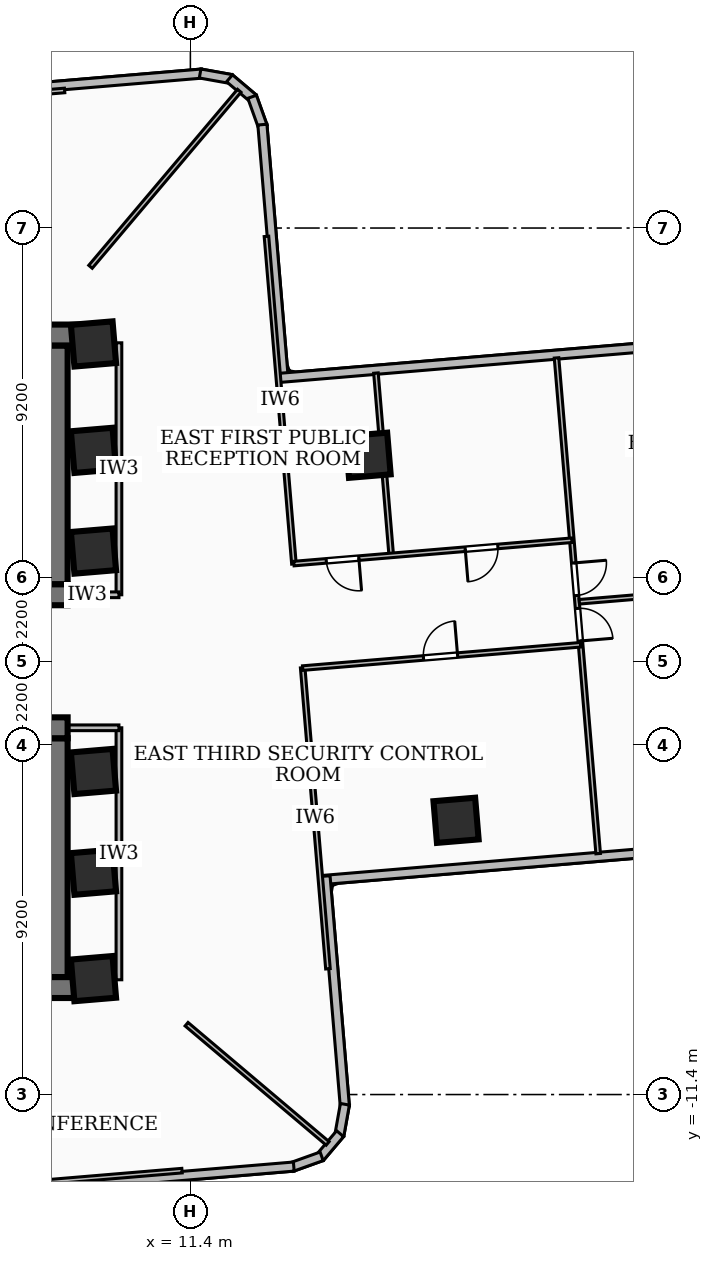
"""IFC4 building model, lengths in metres.
Left out: names, types, materials, properties, quantities, classifications, styles, units other than length and angle.
Written with IfcOpenShell. Run it as: python <this file> out.ifc"""

import sys

from ifc_helpers import new_model, si_unit, direction, frame, frame_2d, origin, origin_2d, place, context, subcontext, project, spatial, rectangle, extrude, element, fill, save


model = new_model("IFC4")
c1 = context("Model", 3, precision=1e-05, world=origin(), true_north=direction((0.0, 1.0)))
c2 = subcontext(c1, "Body", "Model", "MODEL_VIEW")
j1 = project(units=[si_unit("LENGTHUNIT", "METRE"), si_unit("PLANEANGLEUNIT", "RADIAN")], contexts=[c1])
p1 = place(None, origin())
s1 = spatial("IfcSite", under=j1, at=p1, CompositionType="ELEMENT")
p2 = place(p1, origin())
s2 = spatial("IfcBuilding", under=s1, at=p2, CompositionType="ELEMENT")
p3 = place(p2, frame((0.0, 0.0, 64.08)))
s3 = spatial("IfcBuildingStorey", under=s2, at=p3, CompositionType="ELEMENT", Elevation=64.08)
p4 = place(p3, frame((-8.78, 8.585, 0.0), z_axis=(0.0, 0.0, 1.0), x_axis=(1.0, 0.0, 0.0)))
e1 = element("IfcWall", 1, at=p4, inside=s3, PredefinedType="SHEAR", context=c2, shape_type="SweptSolid", body=[
    extrude(rectangle(XDim=17.56, YDim=0.55, at=frame_2d((8.78, 0.0))), origin(), (0.0, 0.0, 1.0), 3.34),
])
p5 = place(p3, frame((8.17, 1.75, 0.0), z_axis=(0.0, 0.0, 1.0), x_axis=(-1.0, 0.0, 0.0)))
e2 = element("IfcWall", 2, at=p5, inside=s3, PredefinedType="SHEAR", context=c2, shape_type="SweptSolid", body=[
    extrude(rectangle(XDim=16.34, YDim=0.55, at=frame_2d((8.17, 0.0))), origin(), (0.0, 0.0, 1.0), 3.34),
])
p6 = place(p5, frame((7.45, 0.0, 0.0)))
e3 = element("IfcOpeningElement", 3, at=p6, cuts=e2, PredefinedType="OPENING", context=c2, shape_type="SweptSolid", body=[
    extrude(rectangle(XDim=1.0, YDim=2.1, at=frame_2d((0.5, 1.05))), frame((0.0, 0.285, 0.0), z_axis=(0.0, -1.0, 0.0), x_axis=(1.0, 0.0, 0.0)), (0.0, 0.0, 1.0), 0.57),
])
p7 = place(p5, frame((3.85, 0.0, 0.0)))
e4 = element("IfcOpeningElement", 4, at=p7, cuts=e2, PredefinedType="OPENING", context=c2, shape_type="SweptSolid", body=[
    extrude(rectangle(XDim=0.9, YDim=2.06, at=frame_2d((0.45, 1.03))), frame((0.0, 0.285, 0.0), z_axis=(0.0, -1.0, 0.0), x_axis=(1.0, 0.0, 0.0)), (0.0, 0.0, 1.0), 0.57),
])
p8 = place(p5, frame((2.35, 0.0, 0.0)))
e5 = element("IfcOpeningElement", 5, at=p8, cuts=e2, PredefinedType="OPENING", context=c2, shape_type="SweptSolid", body=[
    extrude(rectangle(XDim=0.9, YDim=2.06, at=frame_2d((0.45, 1.03))), frame((0.0, 0.285, 0.0), z_axis=(0.0, -1.0, 0.0), x_axis=(1.0, 0.0, 0.0)), (0.0, 0.0, 1.0), 0.57),
])
p9 = place(p5, frame((0.8, 0.0, 0.0)))
e6 = element("IfcOpeningElement", 6, at=p9, cuts=e2, PredefinedType="OPENING", context=c2, shape_type="SweptSolid", body=[
    extrude(rectangle(XDim=0.9, YDim=2.06, at=frame_2d((0.45, 1.03))), frame((0.0, 0.285, 0.0), z_axis=(0.0, -1.0, 0.0), x_axis=(1.0, 0.0, 0.0)), (0.0, 0.0, 1.0), 0.57),
])
p10 = place(p3, frame((7.895, 8.31, 0.0), z_axis=(0.0, 0.0, 1.0), x_axis=(0.0, -1.0, 0.0)))
e7 = element("IfcWall", 7, at=p10, inside=s3, PredefinedType="SHEAR", context=c2, shape_type="SweptSolid", body=[
    extrude(rectangle(XDim=6.285, YDim=0.55, at=frame_2d((3.143, 0.0))), origin(), (0.0, 0.0, 1.0), 3.34),
])
p11 = place(p3, frame((8.78, -8.585, 0.0), z_axis=(0.0, 0.0, 1.0), x_axis=(-1.0, 0.0, 0.0)))
e8 = element("IfcWall", 8, at=p11, inside=s3, PredefinedType="SHEAR", context=c2, shape_type="SweptSolid", body=[
    extrude(rectangle(XDim=17.56, YDim=0.55, at=frame_2d((8.78, 0.0))), origin(), (0.0, 0.0, 1.0), 3.34),
])
p12 = place(p3, frame((-8.17, -1.75, 0.0), z_axis=(0.0, 0.0, 1.0), x_axis=(1.0, 0.0, 0.0)))
e9 = element("IfcWall", 9, at=p12, inside=s3, PredefinedType="SHEAR", context=c2, shape_type="SweptSolid", body=[
    extrude(rectangle(XDim=16.34, YDim=0.55, at=frame_2d((8.17, 0.0))), origin(), (0.0, 0.0, 1.0), 3.34),
])
p13 = place(p12, frame((7.45, 0.0, 0.0)))
e10 = element("IfcOpeningElement", 10, at=p13, cuts=e9, PredefinedType="OPENING", context=c2, shape_type="SweptSolid", body=[
    extrude(rectangle(XDim=1.0, YDim=2.1, at=frame_2d((0.5, 1.05))), frame((0.0, 0.285, 0.0), z_axis=(0.0, -1.0, 0.0), x_axis=(1.0, 0.0, 0.0)), (0.0, 0.0, 1.0), 0.57),
])
p14 = place(p12, frame((10.965, 0.0, 0.0)))
e11 = element("IfcOpeningElement", 11, at=p14, cuts=e9, PredefinedType="OPENING", context=c2, shape_type="SweptSolid", body=[
    extrude(rectangle(XDim=1.05, YDim=2.15, at=frame_2d((0.525, 1.075))), frame((0.0, 0.285, 0.0), z_axis=(0.0, -1.0, 0.0), x_axis=(1.0, 0.0, 0.0)), (0.0, 0.0, 1.0), 0.57),
])
p15 = place(p12, frame((12.525, 0.0, 0.0)))
e12 = element("IfcOpeningElement", 12, at=p15, cuts=e9, PredefinedType="OPENING", context=c2, shape_type="SweptSolid", body=[
    extrude(rectangle(XDim=1.05, YDim=2.15, at=frame_2d((0.525, 1.075))), frame((0.0, 0.285, 0.0), z_axis=(0.0, -1.0, 0.0), x_axis=(1.0, 0.0, 0.0)), (0.0, 0.0, 1.0), 0.57),
])
p16 = place(p12, frame((14.085, 0.0, 0.0)))
e13 = element("IfcOpeningElement", 13, at=p16, cuts=e9, PredefinedType="OPENING", context=c2, shape_type="SweptSolid", body=[
    extrude(rectangle(XDim=1.05, YDim=2.15, at=frame_2d((0.525, 1.075))), frame((0.0, 0.285, 0.0), z_axis=(0.0, -1.0, 0.0), x_axis=(1.0, 0.0, 0.0)), (0.0, 0.0, 1.0), 0.57),
])
p17 = place(p3, frame((7.895, -2.025, 0.0), z_axis=(0.0, 0.0, 1.0), x_axis=(0.0, -1.0, 0.0)))
e14 = element("IfcWall", 14, at=p17, inside=s3, PredefinedType="SHEAR", context=c2, shape_type="SweptSolid", body=[
    extrude(rectangle(XDim=6.285, YDim=0.55, at=frame_2d((3.143, 0.0))), origin(), (0.0, 0.0, 1.0), 3.34),
])
for number, where, z_axis, x_axis in (
    (15, (8.85, -5.55, 0.0), (0.0, 0.0, 1.0), (0.996, 0.084, 0.0)),
    (16, (8.85, -2.9, 0.0), (0.0, 0.0, 1.0), (0.996, 0.084, 0.0)),
    (17, (8.85, 2.9, 0.0), (0.0, 0.0, 1.0), (0.996, 0.084, 0.0)),
    (18, (8.85, 5.55, 0.0), (0.0, 0.0, 1.0), (0.996, 0.084, 0.0)),
    (19, (8.85, -8.35, 0.0), (0.0, 0.0, 1.0), (0.996, 0.084, 0.0)),
    (20, (8.85, 8.35, 0.0), (0.0, 0.0, 1.0), (0.996, 0.084, 0.0)),
    (21, (18.391, -4.184, 0.0), (0.0, 0.0, 1.0), (0.996, 0.084, 0.0)),
    (22, (16.076, 5.421, 0.0), (0.0, 0.0, 1.0), (0.996, 0.084, 0.0)),
):
    element("IfcColumn", number, at=place(p3, frame(where, z_axis=z_axis, x_axis=x_axis)), inside=s3, PredefinedType="COLUMN", context=c2, shape_type="SweptSolid", body=[
        extrude(rectangle(XDim=1.1, YDim=1.1, at=origin_2d()), origin(), (0.0, 0.0, 1.0), 3.6),
    ])
p18 = place(p3, frame((5.652, 14.956, 0.0), z_axis=(0.0, 0.0, 1.0), x_axis=(0.996497087711, 0.083627472659, 0.0)))
e23 = element("IfcWall", 23, at=p18, inside=s3, PredefinedType="SOLIDWALL", context=c2, shape_type="SweptSolid", body=[
    extrude(rectangle(XDim=6.075, YDim=0.24, at=frame_2d((3.038, 0.0))), origin(), (0.0, 0.0, 1.0), 2.072),
])
p19 = place(p3, frame((11.656, 15.466, 0.0), z_axis=(0.0, 0.0, 1.0), x_axis=(0.98444754165, -0.175678791378, 0.0)))
e24 = element("IfcWall", 24, at=p19, inside=s3, PredefinedType="SOLIDWALL", context=c2, shape_type="SweptSolid", body=[
    extrude(rectangle(XDim=0.831, YDim=0.24, at=frame_2d((0.416, 0.0))), origin(), (0.0, 0.0, 1.0), 3.34),
])
p20 = place(p3, frame((12.43, 15.34, 0.0), z_axis=(0.0, 0.0, 1.0), x_axis=(0.763534028842, -0.645767595037, 0.0)))
e25 = element("IfcWall", 25, at=p20, inside=s3, PredefinedType="SOLIDWALL", context=c2, shape_type="SweptSolid", body=[
    extrude(rectangle(XDim=0.815, YDim=0.24, at=frame_2d((0.407, 0.0))), origin(), (0.0, 0.0, 1.0), 3.34),
])
p21 = place(p3, frame((13.025, 14.854, 0.0), z_axis=(0.0, 0.0, 1.0), x_axis=(0.337136933599, -0.941455621898, 0.0)))
e26 = element("IfcWall", 26, at=p21, inside=s3, PredefinedType="SOLIDWALL", context=c2, shape_type="SweptSolid", body=[
    extrude(rectangle(XDim=0.831, YDim=0.24, at=frame_2d((0.415, 0.0))), origin(), (0.0, 0.0, 1.0), 3.34),
])
p22 = place(p3, frame((13.295, 14.121, 0.0), z_axis=(0.0, 0.0, 1.0), x_axis=(0.083713509088, -0.99648986367, 0.0)))
e27 = element("IfcWall", 27, at=p22, inside=s3, PredefinedType="SOLIDWALL", context=c2, shape_type="SweptSolid", body=[
    extrude(rectangle(XDim=6.775, YDim=0.24, at=frame_2d((3.387, 0.0))), origin(), (0.0, 0.0, 1.0), 2.072),
])
p23 = place(p3, frame((13.758, 7.458, 0.0), z_axis=(0.0, 0.0, 1.0), x_axis=(0.996498704409, 0.083608205999, 0.0)))
e28 = element("IfcWall", 28, at=p23, inside=s3, PredefinedType="SOLIDWALL", context=c2, shape_type="SweptSolid", body=[
    extrude(rectangle(XDim=16.875, YDim=0.24, at=frame_2d((8.438, 0.0))), origin(), (0.0, 0.0, 1.0), 2.072),
])
p24 = place(p3, frame((31.684, -4.344, 0.0), z_axis=(0.0, 0.0, 1.0), x_axis=(-0.996492776291, -0.083678831256, 0.0)))
e29 = element("IfcWall", 29, at=p24, inside=s3, PredefinedType="SOLIDWALL", context=c2, shape_type="SweptSolid", body=[
    extrude(rectangle(XDim=16.875, YDim=0.24, at=frame_2d((8.438, 0.0))), origin(), (0.0, 0.0, 1.0), 3.34),
])
p25 = place(p24, frame((1.1, 0.0, 0.85)))
e30 = element("IfcOpeningElement", 30, at=p25, cuts=e29, PredefinedType="OPENING", context=c2, shape_type="SweptSolid", body=[
    extrude(rectangle(XDim=2.4, YDim=1.85, at=frame_2d((1.2, 0.925))), frame((0.0, 0.13, 0.0), z_axis=(0.0, -1.0, 0.0), x_axis=(1.0, 0.0, 0.0)), (0.0, 0.0, 1.0), 0.26),
])
p26 = place(p3, frame((14.956, -5.652, 0.0), z_axis=(0.0, 0.0, 1.0), x_axis=(0.083627472659, -0.996497087711, 0.0)))
e31 = element("IfcWall", 31, at=p26, inside=s3, PredefinedType="SOLIDWALL", context=c2, shape_type="SweptSolid", body=[
    extrude(rectangle(XDim=6.075, YDim=0.24, at=frame_2d((3.038, 0.0))), origin(), (0.0, 0.0, 1.0), 3.34),
])
p27 = place(p3, frame((15.466, -11.656, 0.0), z_axis=(0.0, 0.0, 1.0), x_axis=(-0.175678791378, -0.98444754165, 0.0)))
e32 = element("IfcWall", 32, at=p27, inside=s3, PredefinedType="SOLIDWALL", context=c2, shape_type="SweptSolid", body=[
    extrude(rectangle(XDim=0.831, YDim=0.24, at=frame_2d((0.416, 0.0))), origin(), (0.0, 0.0, 1.0), 3.34),
])
p28 = place(p3, frame((15.34, -12.43, 0.0), z_axis=(0.0, 0.0, 1.0), x_axis=(-0.645767595037, -0.763534028842, 0.0)))
e33 = element("IfcWall", 33, at=p28, inside=s3, PredefinedType="SOLIDWALL", context=c2, shape_type="SweptSolid", body=[
    extrude(rectangle(XDim=0.815, YDim=0.24, at=frame_2d((0.407, 0.0))), origin(), (0.0, 0.0, 1.0), 3.34),
])
p29 = place(p3, frame((14.854, -13.025, 0.0), z_axis=(0.0, 0.0, 1.0), x_axis=(-0.941455621898, -0.337136933599, 0.0)))
e34 = element("IfcWall", 34, at=p29, inside=s3, PredefinedType="SOLIDWALL", context=c2, shape_type="SweptSolid", body=[
    extrude(rectangle(XDim=0.831, YDim=0.24, at=frame_2d((0.415, 0.0))), origin(), (0.0, 0.0, 1.0), 3.34),
])
p30 = place(p3, frame((14.121, -13.295, 0.0), z_axis=(0.0, 0.0, 1.0), x_axis=(-0.99648986367, -0.083713509088, 0.0)))
e35 = element("IfcWall", 35, at=p30, inside=s3, PredefinedType="SOLIDWALL", context=c2, shape_type="SweptSolid", body=[
    extrude(rectangle(XDim=6.775, YDim=0.24, at=frame_2d((3.387, 0.0))), origin(), (0.0, 0.0, 1.0), 3.34),
])
p31 = place(p3, frame((9.52, 1.75, 0.0), z_axis=(0.0, 0.0, 1.0), x_axis=(0.0, 1.0, 0.0)))
e36 = element("IfcWall", 36, at=p31, inside=s3, PredefinedType="PARTITIONING", context=c2, shape_type="SweptSolid", body=[
    extrude(rectangle(XDim=6.63, YDim=0.15, at=frame_2d((3.315, 0.0))), origin(), (0.0, 0.0, 1.0), 2.152),
])
p32 = place(p3, frame((7.85, 1.75, 0.0), z_axis=(0.0, 0.0, 1.0), x_axis=(1.0, 0.0, 0.0)))
e37 = element("IfcWall", 37, at=p32, inside=s3, PredefinedType="PARTITIONING", context=c2, shape_type="SweptSolid", body=[
    extrude(rectangle(XDim=1.67, YDim=0.15, at=frame_2d((0.835, 0.0))), origin(), (0.0, 0.0, 1.0), 2.405),
])
p33 = place(p3, frame((9.52, -8.38, 0.0), z_axis=(0.0, 0.0, 1.0), x_axis=(0.0, 1.0, 0.0)))
e38 = element("IfcWall", 38, at=p33, inside=s3, PredefinedType="PARTITIONING", context=c2, shape_type="SweptSolid", body=[
    extrude(rectangle(XDim=6.63, YDim=0.15, at=frame_2d((3.315, 0.0))), origin(), (0.0, 0.0, 1.0), 2.152),
])
p34 = place(p3, frame((7.85, -1.75, 0.0), z_axis=(0.0, 0.0, 1.0), x_axis=(1.0, 0.0, 0.0)))
e39 = element("IfcWall", 39, at=p34, inside=s3, PredefinedType="PARTITIONING", context=c2, shape_type="SweptSolid", body=[
    extrude(rectangle(XDim=1.67, YDim=0.15, at=frame_2d((0.835, 0.0))), origin(), (0.0, 0.0, 1.0), 2.405),
])
p35 = place(p3, frame((8.772, 10.38, 0.0), z_axis=(0.0, 0.0, 1.0), x_axis=(0.645424146464, 0.763824371935, 0.0)))
e40 = element("IfcWall", 40, at=p35, inside=s3, PredefinedType="PARTITIONING", context=c2, shape_type="SweptSolid", body=[
    extrude(rectangle(XDim=6.064, YDim=0.12, at=frame_2d((3.032, 0.0))), origin(), (0.0, 0.0, 1.0), 2.072),
])
p36 = place(p3, frame((11.3, -9.549, 0.0), z_axis=(0.0, 0.0, 1.0), x_axis=(0.763780578352, -0.645475970221, 0.0)))
e41 = element("IfcWall", 41, at=p36, inside=s3, PredefinedType="PARTITIONING", context=c2, shape_type="SweptSolid", body=[
    extrude(rectangle(XDim=4.86, YDim=0.12, at=frame_2d((2.43, 0.0))), origin(), (0.0, 0.0, 1.0), 3.34),
])
p37 = place(p3, frame((14.125, 2.561, 0.0), z_axis=(0.0, 0.0, 1.0), x_axis=(-0.083580419953, 0.996501035323, 0.0)))
e42 = element("IfcWall", 42, at=p37, inside=s3, PredefinedType="PARTITIONING", context=c2, shape_type="SweptSolid", body=[
    extrude(rectangle(XDim=8.649, YDim=0.12, at=frame_2d((4.325, 0.0))), origin(), (0.0, 0.0, 1.0), 2.072),
])
p38 = place(p3, frame((15.02, -8.091, 0.0), z_axis=(0.0, 0.0, 1.0), x_axis=(-0.083652878615, 0.99649495528, 0.0)))
e43 = element("IfcWall", 43, at=p38, inside=s3, PredefinedType="PARTITIONING", context=c2, shape_type="SweptSolid", body=[
    extrude(rectangle(XDim=7.95, YDim=0.12, at=frame_2d((3.975, 0.0))), origin(), (0.0, 0.0, 1.0), 2.152),
])
p39 = place(p3, frame((16.684, 2.806, 0.0), z_axis=(0.0, 0.0, 1.0), x_axis=(-0.083656467047, 0.996494654035, 0.0)))
e44 = element("IfcWall", 44, at=p39, inside=s3, PredefinedType="PARTITIONING", context=c2, shape_type="SweptSolid", body=[
    extrude(rectangle(XDim=4.795, YDim=0.12, at=frame_2d((2.397, 0.0))), origin(), (0.0, 0.0, 1.0), 2.072),
])
p40 = place(p3, frame((21.439, 3.185, 0.0), z_axis=(0.0, 0.0, 1.0), x_axis=(-0.996495574947, -0.083645496662, 0.0)))
e45 = element("IfcWall", 45, at=p40, inside=s3, PredefinedType="PARTITIONING", context=c2, shape_type="SweptSolid", body=[
    extrude(rectangle(XDim=7.341, YDim=0.12, at=frame_2d((3.67, 0.0))), origin(), (0.0, 0.0, 1.0), 2.152),
])
p41 = place(p40, frame((5.626, 0.0, 0.0)))
e46 = element("IfcOpeningElement", 46, at=p41, cuts=e45, PredefinedType="OPENING", context=c2, shape_type="SweptSolid", body=[
    extrude(rectangle(XDim=0.86, YDim=2.04, at=frame_2d((0.43, 1.02))), frame((0.0, 0.07, 0.0), z_axis=(0.0, -1.0, 0.0), x_axis=(1.0, 0.0, 0.0)), (0.0, 0.0, 1.0), 0.14),
])
p42 = place(p40, frame((1.956, 0.0, 0.0)))
e47 = element("IfcOpeningElement", 47, at=p42, cuts=e45, PredefinedType="OPENING", context=c2, shape_type="SweptSolid", body=[
    extrude(rectangle(XDim=0.86, YDim=2.04, at=frame_2d((0.43, 1.02))), frame((0.0, 0.07, 0.0), z_axis=(0.0, -1.0, 0.0), x_axis=(1.0, 0.0, 0.0)), (0.0, 0.0, 1.0), 0.14),
])
p43 = place(p3, frame((14.355, -0.179, 0.0), z_axis=(0.0, 0.0, 1.0), x_axis=(0.996495574947, 0.083645496662, 0.0)))
e48 = element("IfcWall", 48, at=p43, inside=s3, PredefinedType="PARTITIONING", context=c2, shape_type="SweptSolid", body=[
    extrude(rectangle(XDim=7.341, YDim=0.12, at=frame_2d((3.67, 0.0))), origin(), (0.0, 0.0, 1.0), 2.152),
])
p44 = place(p43, frame((3.19, 0.0, 0.0)))
e49 = element("IfcOpeningElement", 49, at=p44, cuts=e48, PredefinedType="OPENING", context=c2, shape_type="SweptSolid", body=[
    extrude(rectangle(XDim=0.9, YDim=2.06, at=frame_2d((0.45, 1.03))), frame((0.0, 0.07, 0.0), z_axis=(0.0, -1.0, 0.0), x_axis=(1.0, 0.0, 0.0)), (0.0, 0.0, 1.0), 0.14),
])
p45 = place(p3, frame((21.635, 1.566, 0.0), z_axis=(0.0, 0.0, 1.0), x_axis=(0.996496019183, 0.083640204167, 0.0)))
e50 = element("IfcWall", 50, at=p45, inside=s3, PredefinedType="PARTITIONING", context=c2, shape_type="SweptSolid", body=[
    extrude(rectangle(XDim=10.905, YDim=0.12, at=frame_2d((5.453, 0.0))), origin(), (0.0, 0.0, 1.0), 2.152),
])
p46 = place(p3, frame((21.035, 7.983, 0.0), z_axis=(0.0, 0.0, 1.0), x_axis=(0.083743136752, -0.996487374254, 0.0)))
e51 = element("IfcWall", 51, at=p46, inside=s3, PredefinedType="PARTITIONING", context=c2, shape_type="SweptSolid", body=[
    extrude(rectangle(XDim=13.09, YDim=0.12, at=frame_2d((6.545, 0.0))), origin(), (0.0, 0.0, 1.0), 2.152),
])
p47 = place(p46, frame((6.615, 0.0, 0.0)))
e52 = element("IfcOpeningElement", 52, at=p47, cuts=e51, PredefinedType="OPENING", context=c2, shape_type="SweptSolid", body=[
    extrude(rectangle(XDim=0.86, YDim=2.04, at=frame_2d((0.43, 1.02))), frame((0.0, 0.07, 0.0), z_axis=(0.0, -1.0, 0.0), x_axis=(1.0, 0.0, 0.0)), (0.0, 0.0, 1.0), 0.14),
])
p48 = place(p46, frame((5.415, 0.0, 0.0)))
e53 = element("IfcOpeningElement", 53, at=p48, cuts=e51, PredefinedType="OPENING", context=c2, shape_type="SweptSolid", body=[
    extrude(rectangle(XDim=0.86, YDim=2.04, at=frame_2d((0.43, 1.02))), frame((0.0, 0.07, 0.0), z_axis=(0.0, -1.0, 0.0), x_axis=(1.0, 0.0, 0.0)), (0.0, 0.0, 1.0), 0.14),
])
p49 = place(p3, frame((8.091, 15.02, 0.0), z_axis=(0.0, 0.0, 1.0), x_axis=(-0.99649495528, -0.083652878615, 0.0)))
e54 = element("IfcWall", 54, at=p49, inside=s3, PredefinedType="PARTITIONING", context=c2, shape_type="SweptSolid", body=[
    extrude(rectangle(XDim=7.95, YDim=0.12, at=frame_2d((3.975, 0.0))), origin(), (0.0, 0.0, 1.0), 2.072),
])
p50 = place(p3, frame((2.561, -14.125, 0.0), z_axis=(0.0, 0.0, 1.0), x_axis=(0.996501035323, 0.083580419953, 0.0)))
e55 = element("IfcWall", 55, at=p50, inside=s3, PredefinedType="PARTITIONING", context=c2, shape_type="SweptSolid", body=[
    extrude(rectangle(XDim=8.649, YDim=0.12, at=frame_2d((4.325, 0.0))), origin(), (0.0, 0.0, 1.0), 2.152),
])
p51 = place(p41, origin())
e56 = element("IfcDoor", 56, at=p51, inside=s3, OperationType="SINGLE_SWING_LEFT", PredefinedType="DOOR", context=c2, shape_type="SweptSolid", body=[
    extrude(rectangle(XDim=0.86, YDim=2.04, at=frame_2d((0.43, 1.02))), frame((0.0, 0.025, 0.0), z_axis=(0.0, -1.0, 0.0), x_axis=(1.0, 0.0, 0.0)), (0.0, 0.0, 1.0), 0.05),
])
fill(e46, e56)
p52 = place(p42, origin())
e57 = element("IfcDoor", 57, at=p52, inside=s3, OperationType="SINGLE_SWING_RIGHT", PredefinedType="DOOR", context=c2, shape_type="SweptSolid", body=[
    extrude(rectangle(XDim=0.86, YDim=2.04, at=frame_2d((0.43, 1.02))), frame((0.0, 0.025, 0.0), z_axis=(0.0, -1.0, 0.0), x_axis=(1.0, 0.0, 0.0)), (0.0, 0.0, 1.0), 0.05),
])
fill(e47, e57)
p53 = place(p44, origin())
e58 = element("IfcDoor", 58, at=p53, inside=s3, OperationType="SINGLE_SWING_RIGHT", PredefinedType="DOOR", context=c2, shape_type="SweptSolid", body=[
    extrude(rectangle(XDim=0.9, YDim=2.06, at=frame_2d((0.45, 1.03))), frame((0.0, 0.025, 0.0), z_axis=(0.0, -1.0, 0.0), x_axis=(1.0, 0.0, 0.0)), (0.0, 0.0, 1.0), 0.05),
])
fill(e49, e58)
p54 = place(p47, origin())
e59 = element("IfcDoor", 59, at=p54, inside=s3, OperationType="SINGLE_SWING_RIGHT", PredefinedType="DOOR", context=c2, shape_type="SweptSolid", body=[
    extrude(rectangle(XDim=0.86, YDim=2.04, at=frame_2d((0.43, 1.02))), frame((0.0, 0.025, 0.0), z_axis=(0.0, -1.0, 0.0), x_axis=(1.0, 0.0, 0.0)), (0.0, 0.0, 1.0), 0.05),
])
fill(e52, e59)
p55 = place(p48, origin())
e60 = element("IfcDoor", 60, at=p55, inside=s3, OperationType="SINGLE_SWING_LEFT", PredefinedType="DOOR", context=c2, shape_type="SweptSolid", body=[
    extrude(rectangle(XDim=0.86, YDim=2.04, at=frame_2d((0.43, 1.02))), frame((0.0, 0.025, 0.0), z_axis=(0.0, -1.0, 0.0), x_axis=(1.0, 0.0, 0.0)), (0.0, 0.0, 1.0), 0.05),
])
fill(e53, e60)
save(model, sys.argv[1])
